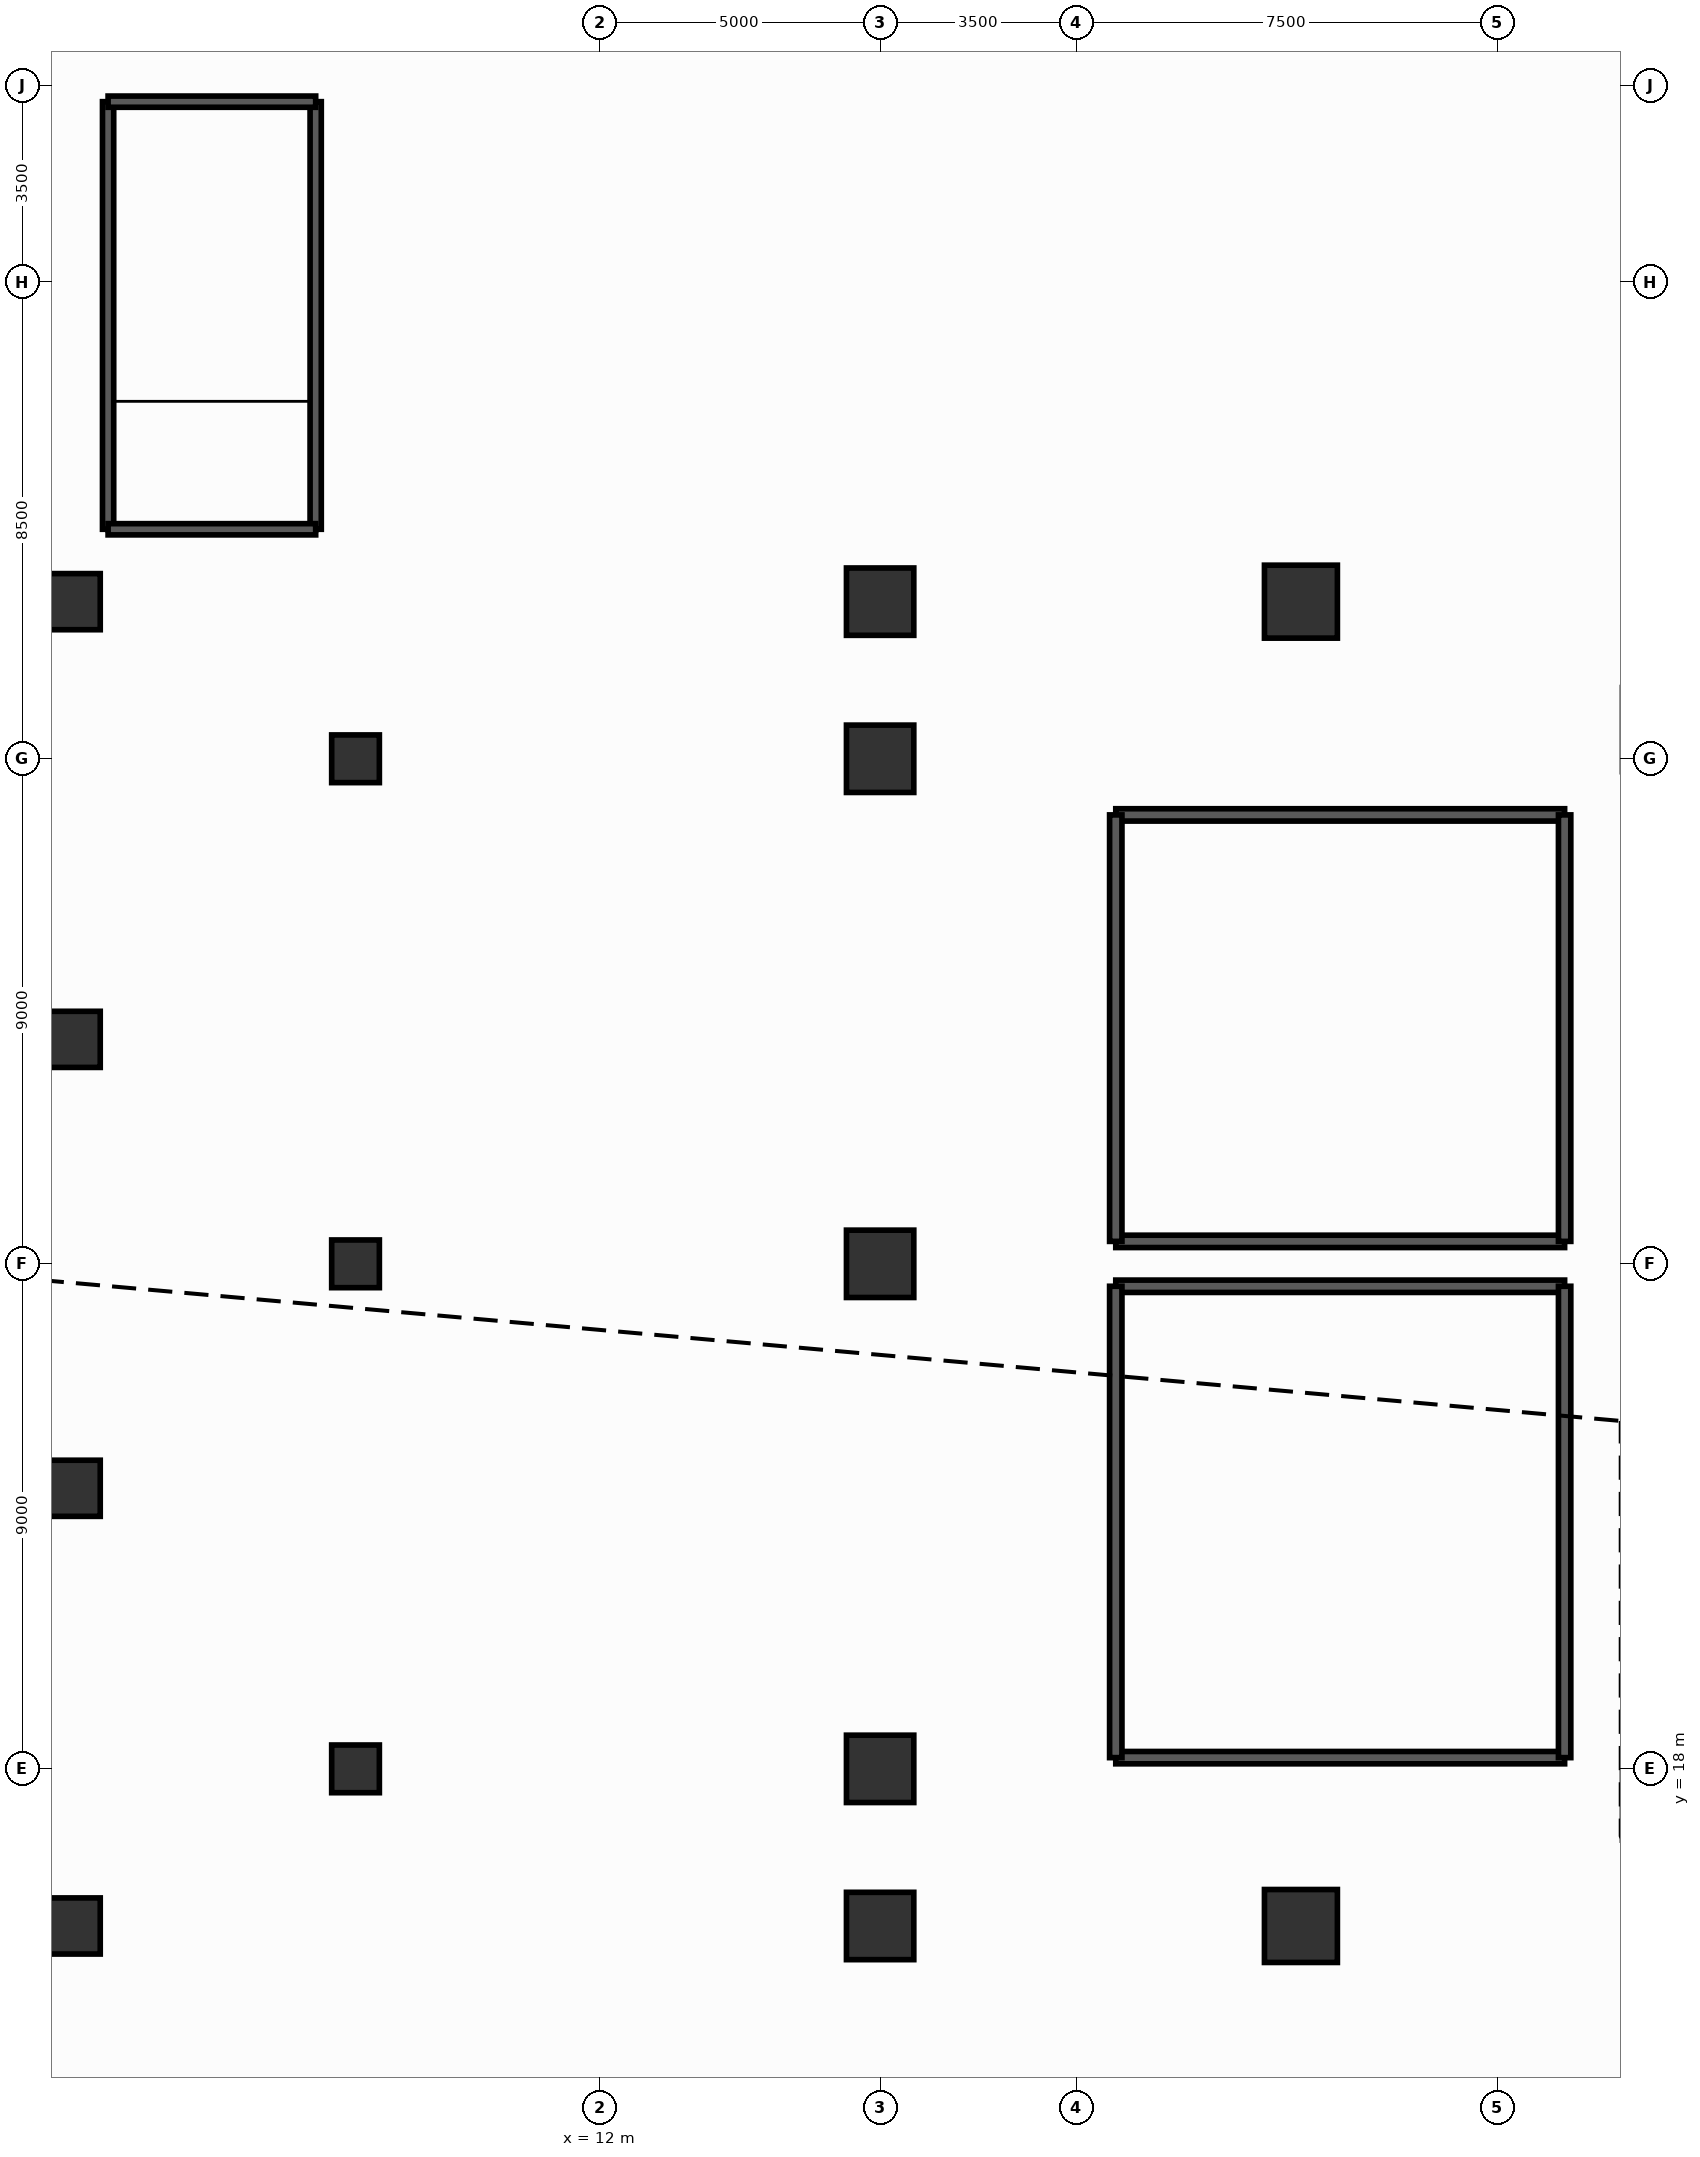
"""IFC4 building model, lengths in metres.
Left out: names, types, materials, properties, quantities, classifications, styles, units other than length and angle.
Written with IfcOpenShell. Run it as: python <this file> out.ifc"""

import sys

from ifc_helpers import new_model, si_unit, direction, frame, frame_2d, origin, origin_2d, place, context, subcontext, project, spatial, rectangle, circle, extrude, source, transform, mapped, element, fill, save


model = new_model("IFC4")
c1 = context("Model", 3, precision=1e-05, world=origin(), true_north=direction((0.0, 1.0)))
c2 = subcontext(c1, "Body", "Model", "MODEL_VIEW")
j1 = project(units=[si_unit("LENGTHUNIT", "METRE"), si_unit("PLANEANGLEUNIT", "RADIAN")], contexts=[c1])
p1 = place(None, origin())
s1 = spatial("IfcSite", under=j1, at=p1, CompositionType="ELEMENT")
p2 = place(p1, origin())
s2 = spatial("IfcBuilding", under=s1, at=p2, CompositionType="ELEMENT")
p3 = place(p2, frame((0.0, 0.0, -9.2)))
s3 = spatial("IfcBuildingStorey", under=s2, at=p3, CompositionType="ELEMENT", Elevation=-9.2)
m1 = source(origin(), c2, "Body", "SweptSolid", [
    extrude(circle(Radius=0.5, at=origin_2d()), origin(), (0.0, 0.0, 1.0), 4.6),
])
for number, where, z_axis, x_axis in (
    (1, (2.6, 15.2, 0.0), (0.0, 0.0, 1.0), (1.0, 0.0, 0.0)),
    (2, (2.6, 23.0, 0.0), (0.0, 0.0, 1.0), (1.0, 0.0, 0.0)),
    (3, (2.6, 31.0, 0.0), (0.0, 0.0, 1.0), (1.0, 0.0, 0.0)),
    (4, (2.6, 38.8, 0.0), (0.0, 0.0, 1.0), (1.0, 0.0, 0.0)),
):
    element("IfcColumn", number, at=place(p3, frame(where, z_axis=z_axis, x_axis=x_axis)), inside=s3, PredefinedType="COLUMN", context=c2, shape_type="MappedRepresentation", body=[
        mapped(m1, transform((0.0, 0.0, 0.0), scale=1.0)),
    ])
m2 = source(origin(), c2, "Body", "SweptSolid", [
    extrude(circle(Radius=0.425, at=origin_2d()), origin(), (0.0, 0.0, 1.0), 4.6),
])
for number, where, z_axis, x_axis in (
    (5, (7.65, 18.0, 0.0), (0.0, 0.0, 1.0), (1.0, 0.0, 0.0)),
    (6, (7.65, 27.0, 0.0), (0.0, 0.0, 1.0), (1.0, 0.0, 0.0)),
    (7, (7.65, 36.0, 0.0), (0.0, 0.0, 1.0), (1.0, 0.0, 0.0)),
):
    element("IfcColumn", number, at=place(p3, frame(where, z_axis=z_axis, x_axis=x_axis)), inside=s3, PredefinedType="COLUMN", context=c2, shape_type="MappedRepresentation", body=[
        mapped(m2, transform((0.0, 0.0, 0.0), scale=1.0)),
    ])
m3 = source(origin(), c2, "Body", "SweptSolid", [
    extrude(rectangle(XDim=1.2, YDim=1.2, at=origin_2d()), origin(), (0.0, 0.0, 1.0), 4.6),
])
for number, where, z_axis, x_axis in (
    (8, (17.0, 15.2, 0.0), (0.0, 0.0, 1.0), (1.0, 0.0, 0.0)),
    (9, (17.0, 18.0, 0.0), (0.0, 0.0, 1.0), (1.0, 0.0, 0.0)),
    (10, (17.0, 27.0, 0.0), (0.0, 0.0, 1.0), (1.0, 0.0, 0.0)),
    (11, (17.0, 36.0, 0.0), (0.0, 0.0, 1.0), (1.0, 0.0, 0.0)),
    (12, (17.0, 38.8, 0.0), (0.0, 0.0, 1.0), (1.0, 0.0, 0.0)),
):
    element("IfcColumn", number, at=place(p3, frame(where, z_axis=z_axis, x_axis=x_axis)), inside=s3, PredefinedType="COLUMN", context=c2, shape_type="MappedRepresentation", body=[
        mapped(m3, transform((0.0, 0.0, 0.0), scale=1.0)),
    ])
m4 = source(origin(), c2, "Body", "SweptSolid", [
    extrude(rectangle(XDim=1.3, YDim=1.3, at=origin_2d()), origin(), (0.0, 0.0, 1.0), 4.6),
])
for number, where, z_axis, x_axis in (
    (13, (24.5, 15.2, 0.0), (0.0, 0.0, 1.0), (1.0, 0.0, 0.0)),
    (14, (24.5, 38.8, 0.0), (0.0, 0.0, 1.0), (1.0, 0.0, 0.0)),
):
    element("IfcColumn", number, at=place(p3, frame(where, z_axis=z_axis, x_axis=x_axis)), inside=s3, PredefinedType="COLUMN", context=c2, shape_type="MappedRepresentation", body=[
        mapped(m4, transform((0.0, 0.0, 0.0), scale=1.0)),
    ])
p4 = place(p3, frame((3.24, 40.09, 0.0), z_axis=(0.0, 0.0, 1.0), x_axis=(0.0, 1.0, 0.0)))
e15 = element("IfcWall", 15, at=p4, inside=s3, PredefinedType="SOLIDWALL", context=c2, shape_type="SweptSolid", body=[
    extrude(rectangle(XDim=7.62, YDim=0.2, at=frame_2d((3.81, 0.0))), origin(), (0.0, 0.0, 1.0), 4.3),
])
p5 = place(p3, frame((6.94, 40.09, 0.0), z_axis=(0.0, 0.0, 1.0), x_axis=(0.0, 1.0, 0.0)))
e16 = element("IfcWall", 16, at=p5, inside=s3, PredefinedType="SOLIDWALL", context=c2, shape_type="SweptSolid", body=[
    extrude(rectangle(XDim=7.62, YDim=0.2, at=frame_2d((3.81, 0.0))), origin(), (0.0, 0.0, 1.0), 4.3),
])
p6 = place(p5, frame((7.15, 0.0, 0.0), z_axis=(0.0, 0.0, 1.0), x_axis=(-1.0, 0.0, 0.0)))
e17 = element("IfcOpeningElement", 17, at=p6, cuts=e16, PredefinedType="OPENING", context=c2, shape_type="SweptSolid", body=[
    extrude(rectangle(XDim=1.1, YDim=2.15, at=frame_2d((0.55, 1.075))), frame((0.0, 0.112, 0.0), z_axis=(0.0, -1.0, 0.0), x_axis=(1.0, 0.0, 0.0)), (0.0, 0.0, 1.0), 0.224),
])
for number, where, z_axis, x_axis in (
    (18, (3.24, 40.09, 0.0), (0.0, 0.0, 1.0), (1.0, 0.0, 0.0)),
    (19, (3.24, 47.71, 0.0), (0.0, 0.0, 1.0), (1.0, 0.0, 0.0)),
):
    element("IfcWall", number, at=place(p3, frame(where, z_axis=z_axis, x_axis=x_axis)), inside=s3, PredefinedType="SOLIDWALL", context=c2, shape_type="SweptSolid", body=[
        extrude(rectangle(XDim=3.7, YDim=0.2, at=frame_2d((1.85, 0.0))), origin(), (0.0, 0.0, 1.0), 4.3),
    ])
for number, where, z_axis, x_axis in (
    (20, (21.2, 18.2, 0.0), (0.0, 0.0, 1.0), (1.0, 0.0, 0.0)),
    (21, (21.2, 26.6, 0.0), (0.0, 0.0, 1.0), (1.0, 0.0, 0.0)),
):
    element("IfcWall", number, at=place(p3, frame(where, z_axis=z_axis, x_axis=x_axis)), inside=s3, PredefinedType="PARTITIONING", context=c2, shape_type="SweptSolid", body=[
        extrude(rectangle(XDim=8.0, YDim=0.22, at=frame_2d((4.0, 0.0))), origin(), (0.0, 0.0, 1.0), 4.3),
    ])
p7 = place(p3, frame((21.2, 18.2, 0.0), z_axis=(0.0, 0.0, 1.0), x_axis=(0.0, 1.0, 0.0)))
e22 = element("IfcWall", 22, at=p7, inside=s3, PredefinedType="PARTITIONING", context=c2, shape_type="SweptSolid", body=[
    extrude(rectangle(XDim=8.4, YDim=0.22, at=frame_2d((4.2, 0.0))), origin(), (0.0, 0.0, 1.0), 4.3),
])
p8 = place(p7, frame((3.65, 0.0, 0.0)))
e23 = element("IfcOpeningElement", 23, at=p8, cuts=e22, PredefinedType="OPENING", context=c2, shape_type="SweptSolid", body=[
    extrude(rectangle(XDim=1.1, YDim=2.15, at=frame_2d((0.55, 1.075))), frame((0.0, 0.122, 0.0), z_axis=(0.0, -1.0, 0.0), x_axis=(1.0, 0.0, 0.0)), (0.0, 0.0, 1.0), 0.244),
])
p9 = place(p3, frame((29.2, 18.2, 0.0), z_axis=(0.0, 0.0, 1.0), x_axis=(0.0, 1.0, 0.0)))
e24 = element("IfcWall", 24, at=p9, inside=s3, PredefinedType="PARTITIONING", context=c2, shape_type="SweptSolid", body=[
    extrude(rectangle(XDim=8.4, YDim=0.22, at=frame_2d((4.2, 0.0))), origin(), (0.0, 0.0, 1.0), 4.3),
])
for number, where, z_axis, x_axis in (
    (25, (21.2, 27.4, 0.0), (0.0, 0.0, 1.0), (1.0, 0.0, 0.0)),
    (26, (21.2, 35.0, 0.0), (0.0, 0.0, 1.0), (1.0, 0.0, 0.0)),
):
    element("IfcWall", number, at=place(p3, frame(where, z_axis=z_axis, x_axis=x_axis)), inside=s3, PredefinedType="PARTITIONING", context=c2, shape_type="SweptSolid", body=[
        extrude(rectangle(XDim=8.0, YDim=0.22, at=frame_2d((4.0, 0.0))), origin(), (0.0, 0.0, 1.0), 4.3),
    ])
p10 = place(p3, frame((21.2, 27.4, 0.0), z_axis=(0.0, 0.0, 1.0), x_axis=(0.0, 1.0, 0.0)))
e27 = element("IfcWall", 27, at=p10, inside=s3, PredefinedType="PARTITIONING", context=c2, shape_type="SweptSolid", body=[
    extrude(rectangle(XDim=7.6, YDim=0.22, at=frame_2d((3.8, 0.0))), origin(), (0.0, 0.0, 1.0), 4.3),
])
p11 = place(p10, frame((3.25, 0.0, 0.0)))
e28 = element("IfcOpeningElement", 28, at=p11, cuts=e27, PredefinedType="OPENING", context=c2, shape_type="SweptSolid", body=[
    extrude(rectangle(XDim=1.1, YDim=2.15, at=frame_2d((0.55, 1.075))), frame((0.0, 0.122, 0.0), z_axis=(0.0, -1.0, 0.0), x_axis=(1.0, 0.0, 0.0)), (0.0, 0.0, 1.0), 0.244),
])
p12 = place(p3, frame((29.2, 27.4, 0.0), z_axis=(0.0, 0.0, 1.0), x_axis=(0.0, 1.0, 0.0)))
e29 = element("IfcWall", 29, at=p12, inside=s3, PredefinedType="PARTITIONING", context=c2, shape_type="SweptSolid", body=[
    extrude(rectangle(XDim=7.6, YDim=0.22, at=frame_2d((3.8, 0.0))), origin(), (0.0, 0.0, 1.0), 4.3),
])
m5 = source(origin(), c2, "Body", "SweptSolid", [
    extrude(rectangle(XDim=1.1, YDim=2.15, at=frame_2d((0.55, 1.075))), frame((0.0, 0.025, 0.0), z_axis=(0.0, -1.0, 0.0), x_axis=(1.0, 0.0, 0.0)), (0.0, 0.0, 1.0), 0.05),
])
p13 = place(p6, origin())
e30 = element("IfcDoor", 30, at=p13, inside=s3, OperationType="SINGLE_SWING_RIGHT", PredefinedType="DOOR", context=c2, shape_type="MappedRepresentation", body=[
    mapped(m5, transform((0.0, 0.0, 0.0), scale=1.0)),
])
fill(e17, e30)
p14 = place(p8, origin())
e31 = element("IfcDoor", 31, at=p14, inside=s3, OperationType="SINGLE_SWING_RIGHT", PredefinedType="DOOR", context=c2, shape_type="MappedRepresentation", body=[
    mapped(m5, transform((0.0, 0.0, 0.0), scale=1.0)),
])
fill(e23, e31)
p15 = place(p11, origin())
e32 = element("IfcDoor", 32, at=p15, inside=s3, OperationType="SINGLE_SWING_LEFT", PredefinedType="DOOR", context=c2, shape_type="MappedRepresentation", body=[
    mapped(m5, transform((0.0, 0.0, 0.0), scale=1.0)),
])
fill(e28, e32)
save(model, sys.argv[1])
